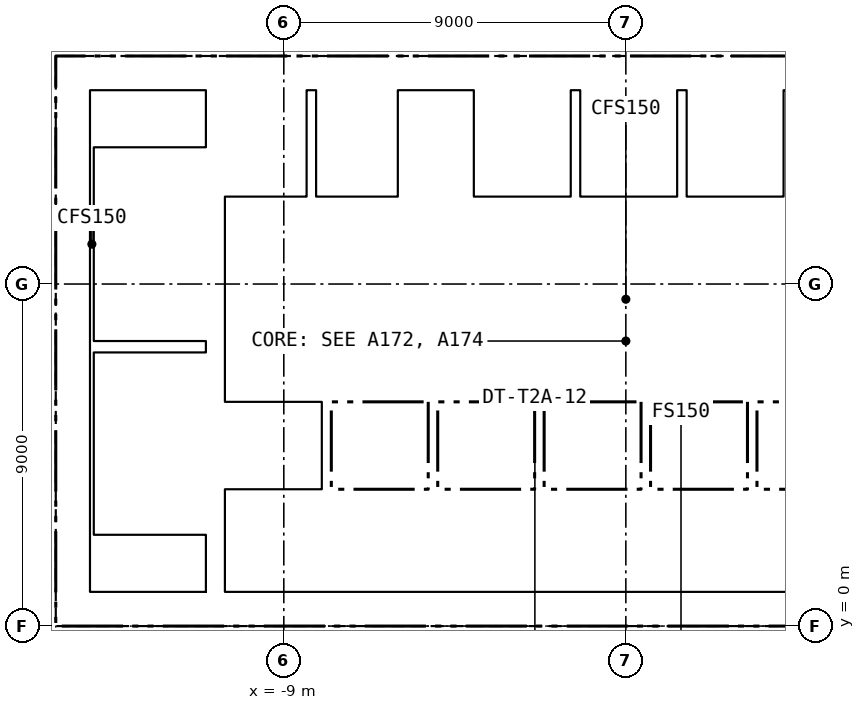
"""IFC4 building model, lengths in metres.
Left out: names, types, materials, properties, quantities, classifications, styles, units other than length and angle.
Written with IfcOpenShell. Run it as: python <this file> out.ifc"""

import sys

from ifc_helpers import new_model, si_unit, direction, frame, frame_2d, origin, place, context, subcontext, project, spatial, rectangle, extrude, element, fill, save


model = new_model("IFC4")
c1 = context("Model", 3, precision=1e-05, world=origin(), true_north=direction((0.0, 1.0)))
c2 = subcontext(c1, "Body", "Model", "MODEL_VIEW")
j1 = project(units=[si_unit("LENGTHUNIT", "METRE"), si_unit("PLANEANGLEUNIT", "RADIAN")], contexts=[c1])
p1 = place(None, origin())
s1 = spatial("IfcSite", under=j1, at=p1, CompositionType="ELEMENT")
p2 = place(p1, origin())
s2 = spatial("IfcBuilding", under=s1, at=p2, CompositionType="ELEMENT")
p3 = place(p2, frame((0.0, 0.0, 80.65)))
s3 = spatial("IfcBuildingStorey", under=s2, at=p3, CompositionType="ELEMENT", Elevation=80.65)
p4 = place(p3, frame((-15.0, 0.45, -0.15), z_axis=(0.0, 0.0, 1.0), x_axis=(1.0, 0.0, 0.0)))
e1 = element("IfcWall", 1, at=p4, inside=s3, PredefinedType="SOLIDWALL", context=c2, shape_type="SweptSolid", body=[
    extrude(rectangle(XDim=30.0, YDim=0.9, at=frame_2d((15.0, 0.0))), origin(), (0.0, 0.0, 1.0), 3.65),
])
p5 = place(p4, frame((5.8, 0.0, 0.15)))
e2 = element("IfcOpeningElement", 2, at=p5, cuts=e1, PredefinedType="OPENING", context=c2, shape_type="SweptSolid", body=[
    extrude(rectangle(XDim=2.4, YDim=2.4, at=frame_2d((1.2, 1.2))), frame((0.0, 0.46, 0.0), z_axis=(0.0, -1.0, 0.0), x_axis=(1.0, 0.0, 0.0)), (0.0, 0.0, 1.0), 0.92),
])
p6 = place(p4, frame((13.8, 0.0, 0.15)))
e3 = element("IfcOpeningElement", 3, at=p6, cuts=e1, PredefinedType="OPENING", context=c2, shape_type="SweptSolid", body=[
    extrude(rectangle(XDim=2.4, YDim=2.4, at=frame_2d((1.2, 1.2))), frame((0.0, 0.46, 0.0), z_axis=(0.0, -1.0, 0.0), x_axis=(1.0, 0.0, 0.0)), (0.0, 0.0, 1.0), 0.92),
])
p7 = place(p4, frame((21.8, 0.0, 0.15)))
e4 = element("IfcOpeningElement", 4, at=p7, cuts=e1, PredefinedType="OPENING", context=c2, shape_type="SweptSolid", body=[
    extrude(rectangle(XDim=2.4, YDim=2.4, at=frame_2d((1.2, 1.2))), frame((0.0, 0.46, 0.0), z_axis=(0.0, -1.0, 0.0), x_axis=(1.0, 0.0, 0.0)), (0.0, 0.0, 1.0), 0.92),
])
p8 = place(p4, frame((1.5, 0.0, 0.15)))
e5 = element("IfcOpeningElement", 5, at=p8, cuts=e1, PredefinedType="OPENING", context=c2, shape_type="SweptSolid", body=[
    extrude(rectangle(XDim=1.2, YDim=2.1, at=frame_2d((0.6, 1.05))), frame((0.0, 0.46, 0.0), z_axis=(0.0, -1.0, 0.0), x_axis=(1.0, 0.0, 0.0)), (0.0, 0.0, 1.0), 0.92),
])
p9 = place(p4, frame((27.3, 0.0, 0.15)))
e6 = element("IfcOpeningElement", 6, at=p9, cuts=e1, PredefinedType="OPENING", context=c2, shape_type="SweptSolid", body=[
    extrude(rectangle(XDim=1.2, YDim=2.1, at=frame_2d((0.6, 1.05))), frame((0.0, 0.46, 0.0), z_axis=(0.0, -1.0, 0.0), x_axis=(1.0, 0.0, 0.0)), (0.0, 0.0, 1.0), 0.92),
])
p10 = place(p3, frame((-15.0, 14.55, -0.15), z_axis=(0.0, 0.0, 1.0), x_axis=(1.0, 0.0, 0.0)))
e7 = element("IfcWall", 7, at=p10, inside=s3, PredefinedType="SOLIDWALL", context=c2, shape_type="SweptSolid", body=[
    extrude(rectangle(XDim=30.0, YDim=0.9, at=frame_2d((15.0, 0.0))), origin(), (0.0, 0.0, 1.0), 3.65),
])
p11 = place(p10, frame((9.25, 0.0, 0.15)))
e8 = element("IfcOpeningElement", 8, at=p11, cuts=e7, PredefinedType="OPENING", context=c2, shape_type="SweptSolid", body=[
    extrude(rectangle(XDim=1.5, YDim=2.1, at=frame_2d((0.75, 1.05))), frame((0.0, 0.46, 0.0), z_axis=(0.0, -1.0, 0.0), x_axis=(1.0, 0.0, 0.0)), (0.0, 0.0, 1.0), 0.92),
])
p12 = place(p10, frame((19.4, 0.0, 0.15)))
e9 = element("IfcOpeningElement", 9, at=p12, cuts=e7, PredefinedType="OPENING", context=c2, shape_type="SweptSolid", body=[
    extrude(rectangle(XDim=1.5, YDim=2.1, at=frame_2d((0.75, 1.05))), frame((0.0, 0.46, 0.0), z_axis=(0.0, -1.0, 0.0), x_axis=(1.0, 0.0, 0.0)), (0.0, 0.0, 1.0), 0.92),
])
p13 = place(p10, frame((1.5, 0.0, 0.15)))
e10 = element("IfcOpeningElement", 10, at=p13, cuts=e7, PredefinedType="OPENING", context=c2, shape_type="SweptSolid", body=[
    extrude(rectangle(XDim=1.2, YDim=2.1, at=frame_2d((0.6, 1.05))), frame((0.0, 0.46, 0.0), z_axis=(0.0, -1.0, 0.0), x_axis=(1.0, 0.0, 0.0)), (0.0, 0.0, 1.0), 0.92),
])
p14 = place(p10, frame((27.3, 0.0, 0.15)))
e11 = element("IfcOpeningElement", 11, at=p14, cuts=e7, PredefinedType="OPENING", context=c2, shape_type="SweptSolid", body=[
    extrude(rectangle(XDim=1.2, YDim=2.1, at=frame_2d((0.6, 1.05))), frame((0.0, 0.46, 0.0), z_axis=(0.0, -1.0, 0.0), x_axis=(1.0, 0.0, 0.0)), (0.0, 0.0, 1.0), 0.92),
])
p15 = place(p3, frame((-14.55, 0.9, -0.15), z_axis=(0.0, 0.0, 1.0), x_axis=(0.0, 1.0, 0.0)))
e12 = element("IfcWall", 12, at=p15, inside=s3, PredefinedType="SOLIDWALL", context=c2, shape_type="SweptSolid", body=[
    extrude(rectangle(XDim=13.2, YDim=0.9, at=frame_2d((6.6, 0.0))), origin(), (0.0, 0.0, 1.0), 3.65),
])
p16 = place(p3, frame((-10.8, 0.9, -0.15), z_axis=(0.0, 0.0, 1.0), x_axis=(0.0, 1.0, 0.0)))
e13 = element("IfcWall", 13, at=p16, inside=s3, PredefinedType="SOLIDWALL", context=c2, shape_type="SweptSolid", body=[
    extrude(rectangle(XDim=13.2, YDim=0.5, at=frame_2d((6.6, 0.0))), origin(), (0.0, 0.0, 1.0), 3.65),
])
p17 = place(p3, frame((-10.55, 3.5, 0.0), z_axis=(0.0, 0.0, 1.0), x_axis=(1.0, 0.0, 0.0)))
e14 = element("IfcWall", 14, at=p17, inside=s3, PredefinedType="PARTITIONING", context=c2, shape_type="SweptSolid", body=[
    extrude(rectangle(XDim=21.1, YDim=0.2, at=frame_2d((10.55, 0.0))), origin(), (0.0, 0.0, 1.0), 3.5),
])
p18 = place(p17, frame((0.675, 0.0, 0.0)))
e15 = element("IfcOpeningElement", 15, at=p18, cuts=e14, PredefinedType="OPENING", context=c2, shape_type="SweptSolid", body=[
    extrude(rectangle(XDim=1.2, YDim=2.1, at=frame_2d((0.6, 1.05))), frame((0.0, 0.11, 0.0), z_axis=(0.0, -1.0, 0.0), x_axis=(1.0, 0.0, 0.0)), (0.0, 0.0, 1.0), 0.22),
])
p19 = place(p17, frame((3.475, 0.0, 0.0)))
e16 = element("IfcOpeningElement", 16, at=p19, cuts=e14, PredefinedType="OPENING", context=c2, shape_type="SweptSolid", body=[
    extrude(rectangle(XDim=1.2, YDim=2.1, at=frame_2d((0.6, 1.05))), frame((0.0, 0.11, 0.0), z_axis=(0.0, -1.0, 0.0), x_axis=(1.0, 0.0, 0.0)), (0.0, 0.0, 1.0), 0.22),
])
p20 = place(p17, frame((6.275, 0.0, 0.0)))
e17 = element("IfcOpeningElement", 17, at=p20, cuts=e14, PredefinedType="OPENING", context=c2, shape_type="SweptSolid", body=[
    extrude(rectangle(XDim=1.2, YDim=2.1, at=frame_2d((0.6, 1.05))), frame((0.0, 0.11, 0.0), z_axis=(0.0, -1.0, 0.0), x_axis=(1.0, 0.0, 0.0)), (0.0, 0.0, 1.0), 0.22),
])
p21 = place(p17, frame((9.075, 0.0, 0.0)))
e18 = element("IfcOpeningElement", 18, at=p21, cuts=e14, PredefinedType="OPENING", context=c2, shape_type="SweptSolid", body=[
    extrude(rectangle(XDim=1.2, YDim=2.1, at=frame_2d((0.6, 1.05))), frame((0.0, 0.11, 0.0), z_axis=(0.0, -1.0, 0.0), x_axis=(1.0, 0.0, 0.0)), (0.0, 0.0, 1.0), 0.22),
])
p22 = place(p17, frame((11.875, 0.0, 0.0)))
e19 = element("IfcOpeningElement", 19, at=p22, cuts=e14, PredefinedType="OPENING", context=c2, shape_type="SweptSolid", body=[
    extrude(rectangle(XDim=1.2, YDim=2.1, at=frame_2d((0.6, 1.05))), frame((0.0, 0.11, 0.0), z_axis=(0.0, -1.0, 0.0), x_axis=(1.0, 0.0, 0.0)), (0.0, 0.0, 1.0), 0.22),
])
p23 = place(p17, frame((14.675, 0.0, 0.0)))
e20 = element("IfcOpeningElement", 20, at=p23, cuts=e14, PredefinedType="OPENING", context=c2, shape_type="SweptSolid", body=[
    extrude(rectangle(XDim=1.2, YDim=2.1, at=frame_2d((0.6, 1.05))), frame((0.0, 0.11, 0.0), z_axis=(0.0, -1.0, 0.0), x_axis=(1.0, 0.0, 0.0)), (0.0, 0.0, 1.0), 0.22),
])
p24 = place(p17, frame((17.475, 0.0, 0.0)))
e21 = element("IfcOpeningElement", 21, at=p24, cuts=e14, PredefinedType="OPENING", context=c2, shape_type="SweptSolid", body=[
    extrude(rectangle(XDim=1.2, YDim=2.1, at=frame_2d((0.6, 1.05))), frame((0.0, 0.11, 0.0), z_axis=(0.0, -1.0, 0.0), x_axis=(1.0, 0.0, 0.0)), (0.0, 0.0, 1.0), 0.22),
])
p25 = place(p17, frame((19.9, 0.0, 0.0)))
e22 = element("IfcOpeningElement", 22, at=p25, cuts=e14, PredefinedType="OPENING", context=c2, shape_type="SweptSolid", body=[
    extrude(rectangle(XDim=0.9, YDim=2.1, at=frame_2d((0.45, 1.05))), frame((0.0, 0.11, 0.0), z_axis=(0.0, -1.0, 0.0), x_axis=(1.0, 0.0, 0.0)), (0.0, 0.0, 1.0), 0.22),
])
p26 = place(p3, frame((-10.55, 6.025, 0.0), z_axis=(0.0, 0.0, 1.0), x_axis=(1.0, 0.0, 0.0)))
e23 = element("IfcWall", 23, at=p26, inside=s3, PredefinedType="PARTITIONING", context=c2, shape_type="SweptSolid", body=[
    extrude(rectangle(XDim=21.1, YDim=0.25, at=frame_2d((10.55, 0.0))), origin(), (0.0, 0.0, 1.0), 3.5),
])
p27 = place(p3, frame((-4.125, 8.55, 0.0), z_axis=(0.0, 0.0, 1.0), x_axis=(1.0, 0.0, 0.0)))
e24 = element("IfcWall", 24, at=p27, inside=s3, PredefinedType="PARTITIONING", context=c2, shape_type="SweptSolid", body=[
    extrude(rectangle(XDim=14.675, YDim=0.2, at=frame_2d((7.337, 0.0))), origin(), (0.0, 0.0, 1.0), 3.5),
])
p28 = place(p27, frame((1.413, 0.0, 0.0)))
e25 = element("IfcOpeningElement", 25, at=p28, cuts=e24, PredefinedType="OPENING", context=c2, shape_type="SweptSolid", body=[
    extrude(rectangle(XDim=1.0, YDim=2.1, at=frame_2d((0.5, 1.05))), frame((0.0, 0.11, 0.0), z_axis=(0.0, -1.0, 0.0), x_axis=(1.0, 0.0, 0.0)), (0.0, 0.0, 1.0), 0.22),
])
p29 = place(p27, frame((5.0, 0.0, 0.0)))
e26 = element("IfcOpeningElement", 26, at=p29, cuts=e24, PredefinedType="OPENING", context=c2, shape_type="SweptSolid", body=[
    extrude(rectangle(XDim=1.0, YDim=2.1, at=frame_2d((0.5, 1.05))), frame((0.0, 0.11, 0.0), z_axis=(0.0, -1.0, 0.0), x_axis=(1.0, 0.0, 0.0)), (0.0, 0.0, 1.0), 0.22),
])
p30 = place(p27, frame((9.613, 0.0, 0.0)))
e27 = element("IfcOpeningElement", 27, at=p30, cuts=e24, PredefinedType="OPENING", context=c2, shape_type="SweptSolid", body=[
    extrude(rectangle(XDim=1.0, YDim=2.1, at=frame_2d((0.5, 1.05))), frame((0.0, 0.11, 0.0), z_axis=(0.0, -1.0, 0.0), x_axis=(1.0, 0.0, 0.0)), (0.0, 0.0, 1.0), 0.22),
])
p31 = place(p27, frame((13.475, 0.0, 0.0)))
e28 = element("IfcOpeningElement", 28, at=p31, cuts=e24, PredefinedType="OPENING", context=c2, shape_type="SweptSolid", body=[
    extrude(rectangle(XDim=0.9, YDim=2.1, at=frame_2d((0.45, 1.05))), frame((0.0, 0.11, 0.0), z_axis=(0.0, -1.0, 0.0), x_axis=(1.0, 0.0, 0.0)), (0.0, 0.0, 1.0), 0.22),
])
p32 = place(p3, frame((-10.55, 11.2, 0.0), z_axis=(0.0, 0.0, 1.0), x_axis=(1.0, 0.0, 0.0)))
e29 = element("IfcWall", 29, at=p32, inside=s3, PredefinedType="PARTITIONING", context=c2, shape_type="SweptSolid", body=[
    extrude(rectangle(XDim=4.8, YDim=0.2, at=frame_2d((2.4, 0.0))), origin(), (0.0, 0.0, 1.0), 3.5),
])
p33 = place(p32, frame((0.525, 0.0, 0.0)))
e30 = element("IfcOpeningElement", 30, at=p33, cuts=e29, PredefinedType="OPENING", context=c2, shape_type="SweptSolid", body=[
    extrude(rectangle(XDim=1.1, YDim=2.1, at=frame_2d((0.55, 1.05))), frame((0.0, 0.11, 0.0), z_axis=(0.0, -1.0, 0.0), x_axis=(1.0, 0.0, 0.0)), (0.0, 0.0, 1.0), 0.22),
])
p34 = place(p32, frame((2.925, 0.0, 0.0)))
e31 = element("IfcOpeningElement", 31, at=p34, cuts=e29, PredefinedType="OPENING", context=c2, shape_type="SweptSolid", body=[
    extrude(rectangle(XDim=1.1, YDim=2.1, at=frame_2d((0.55, 1.05))), frame((0.0, 0.11, 0.0), z_axis=(0.0, -1.0, 0.0), x_axis=(1.0, 0.0, 0.0)), (0.0, 0.0, 1.0), 0.22),
])
p35 = place(p3, frame((-4.25, 11.2, 0.0), z_axis=(0.0, 0.0, 1.0), x_axis=(1.0, 0.0, 0.0)))
e32 = element("IfcWall", 32, at=p35, inside=s3, PredefinedType="PARTITIONING", context=c2, shape_type="SweptSolid", body=[
    extrude(rectangle(XDim=8.65, YDim=0.2, at=frame_2d((4.325, 0.0))), origin(), (0.0, 0.0, 1.0), 3.5),
])
p36 = place(p35, frame((0.825, 0.0, 0.0)))
e33 = element("IfcOpeningElement", 33, at=p36, cuts=e32, PredefinedType="OPENING", context=c2, shape_type="SweptSolid", body=[
    extrude(rectangle(XDim=1.4, YDim=2.1, at=frame_2d((0.7, 1.05))), frame((0.0, 0.11, 0.0), z_axis=(0.0, -1.0, 0.0), x_axis=(1.0, 0.0, 0.0)), (0.0, 0.0, 1.0), 0.22),
])
p37 = place(p35, frame((3.625, 0.0, 0.0)))
e34 = element("IfcOpeningElement", 34, at=p37, cuts=e32, PredefinedType="OPENING", context=c2, shape_type="SweptSolid", body=[
    extrude(rectangle(XDim=1.4, YDim=2.1, at=frame_2d((0.7, 1.05))), frame((0.0, 0.11, 0.0), z_axis=(0.0, -1.0, 0.0), x_axis=(1.0, 0.0, 0.0)), (0.0, 0.0, 1.0), 0.22),
])
p38 = place(p3, frame((-4.125, 6.15, 0.0), z_axis=(0.0, 0.0, 1.0), x_axis=(0.0, 1.0, 0.0)))
e35 = element("IfcWall", 35, at=p38, inside=s3, PredefinedType="PARTITIONING", context=c2, shape_type="SweptSolid", body=[
    extrude(rectangle(XDim=4.95, YDim=0.25, at=frame_2d((2.475, 0.0))), origin(), (0.0, 0.0, 1.0), 3.5),
])
p39 = place(p38, frame((3.125, 0.0, 0.0)))
e36 = element("IfcOpeningElement", 36, at=p39, cuts=e35, PredefinedType="OPENING", context=c2, shape_type="SweptSolid", body=[
    extrude(rectangle(XDim=1.2, YDim=2.1, at=frame_2d((0.6, 1.05))), frame((0.0, 0.135, 0.0), z_axis=(0.0, -1.0, 0.0), x_axis=(1.0, 0.0, 0.0)), (0.0, 0.0, 1.0), 0.27),
])
for number, where, z_axis, x_axis in (
    (37, (-7.875, 3.6, 0.0), (0.0, 0.0, 1.0), (0.0, 1.0, 0.0)),
    (38, (-5.075, 3.6, 0.0), (0.0, 0.0, 1.0), (0.0, 1.0, 0.0)),
    (39, (-2.275, 3.6, 0.0), (0.0, 0.0, 1.0), (0.0, 1.0, 0.0)),
    (40, (0.525, 3.6, 0.0), (0.0, 0.0, 1.0), (0.0, 1.0, 0.0)),
    (41, (3.325, 3.6, 0.0), (0.0, 0.0, 1.0), (0.0, 1.0, 0.0)),
):
    element("IfcWall", number, at=place(p3, frame(where, z_axis=z_axis, x_axis=x_axis)), inside=s3, PredefinedType="PARTITIONING", context=c2, shape_type="SweptSolid", body=[
        extrude(rectangle(XDim=2.3, YDim=0.25, at=frame_2d((1.15, 0.0))), origin(), (0.0, 0.0, 1.0), 3.5),
    ])
for number, where, z_axis, x_axis in (
    (42, (-0.35, 6.15, 0.0), (0.0, 0.0, 1.0), (0.0, 1.0, 0.0)),
    (43, (3.1, 6.15, 0.0), (0.0, 0.0, 1.0), (0.0, 1.0, 0.0)),
):
    element("IfcWall", number, at=place(p3, frame(where, z_axis=z_axis, x_axis=x_axis)), inside=s3, PredefinedType="PARTITIONING", context=c2, shape_type="SweptSolid", body=[
        extrude(rectangle(XDim=2.3, YDim=0.15, at=frame_2d((1.15, 0.0))), origin(), (0.0, 0.0, 1.0), 3.5),
    ])
for number, where, z_axis, x_axis in (
    (44, (-8.275, 11.3, 0.0), (0.0, 0.0, 1.0), (0.0, 1.0, 0.0)),
    (45, (-5.875, 11.3, 0.0), (0.0, 0.0, 1.0), (0.0, 1.0, 0.0)),
    (46, (-4.125, 11.3, 0.0), (0.0, 0.0, 1.0), (0.0, 1.0, 0.0)),
    (47, (-1.325, 11.3, 0.0), (0.0, 0.0, 1.0), (0.0, 1.0, 0.0)),
    (48, (1.475, 11.3, 0.0), (0.0, 0.0, 1.0), (0.0, 1.0, 0.0)),
    (49, (4.275, 11.3, 0.0), (0.0, 0.0, 1.0), (0.0, 1.0, 0.0)),
):
    element("IfcWall", number, at=place(p3, frame(where, z_axis=z_axis, x_axis=x_axis)), inside=s3, PredefinedType="PARTITIONING", context=c2, shape_type="SweptSolid", body=[
        extrude(rectangle(XDim=2.8, YDim=0.25, at=frame_2d((1.4, 0.0))), origin(), (0.0, 0.0, 1.0), 3.5),
    ])
p40 = place(p3, frame((-14.0, 7.35, 0.0), z_axis=(0.0, 0.0, 1.0), x_axis=(1.0, 0.0, 0.0)))
e50 = element("IfcWall", 50, at=p40, inside=s3, PredefinedType="SOLIDWALL", context=c2, shape_type="SweptSolid", body=[
    extrude(rectangle(XDim=2.95, YDim=0.3, at=frame_2d((1.475, 0.0))), origin(), (0.0, 0.0, 1.0), 3.5),
])
p41 = place(p3, frame((-14.05, 0.9, 0.0), z_axis=(0.0, 0.0, 1.0), x_axis=(0.0, 1.0, 0.0)))
e51 = element("IfcWall", 51, at=p41, inside=s3, PredefinedType="SOLIDWALL", context=c2, shape_type="SweptSolid", body=[
    extrude(rectangle(XDim=13.2, YDim=0.1, at=frame_2d((6.6, 0.0))), origin(), (0.0, 0.0, 1.0), 3.5),
])
p42 = place(p39, origin())
e52 = element("IfcDoor", 52, at=p42, inside=s3, OperationType="SINGLE_SWING_LEFT", PredefinedType="DOOR", context=c2, shape_type="SweptSolid", body=[
    extrude(rectangle(XDim=1.2, YDim=2.1, at=frame_2d((0.6, 1.05))), frame((0.0, 0.025, 0.0), z_axis=(0.0, -1.0, 0.0), x_axis=(1.0, 0.0, 0.0)), (0.0, 0.0, 1.0), 0.05),
])
fill(e36, e52)
p43 = place(p18, origin())
e53 = element("IfcDoor", 53, at=p43, inside=s3, OperationType="DOUBLE_DOOR_SLIDING", PredefinedType="DOOR", context=c2, shape_type="SweptSolid", body=[
    extrude(rectangle(XDim=1.2, YDim=2.1, at=frame_2d((0.6, 1.05))), frame((0.0, 0.025, 0.0), z_axis=(0.0, -1.0, 0.0), x_axis=(1.0, 0.0, 0.0)), (0.0, 0.0, 1.0), 0.05),
])
fill(e15, e53)
p44 = place(p19, origin())
e54 = element("IfcDoor", 54, at=p44, inside=s3, OperationType="DOUBLE_DOOR_SLIDING", PredefinedType="DOOR", context=c2, shape_type="SweptSolid", body=[
    extrude(rectangle(XDim=1.2, YDim=2.1, at=frame_2d((0.6, 1.05))), frame((0.0, 0.025, 0.0), z_axis=(0.0, -1.0, 0.0), x_axis=(1.0, 0.0, 0.0)), (0.0, 0.0, 1.0), 0.05),
])
fill(e16, e54)
p45 = place(p20, origin())
e55 = element("IfcDoor", 55, at=p45, inside=s3, OperationType="DOUBLE_DOOR_SLIDING", PredefinedType="DOOR", context=c2, shape_type="SweptSolid", body=[
    extrude(rectangle(XDim=1.2, YDim=2.1, at=frame_2d((0.6, 1.05))), frame((0.0, 0.025, 0.0), z_axis=(0.0, -1.0, 0.0), x_axis=(1.0, 0.0, 0.0)), (0.0, 0.0, 1.0), 0.05),
])
fill(e17, e55)
p46 = place(p21, origin())
e56 = element("IfcDoor", 56, at=p46, inside=s3, OperationType="DOUBLE_DOOR_SLIDING", PredefinedType="DOOR", context=c2, shape_type="SweptSolid", body=[
    extrude(rectangle(XDim=1.2, YDim=2.1, at=frame_2d((0.6, 1.05))), frame((0.0, 0.025, 0.0), z_axis=(0.0, -1.0, 0.0), x_axis=(1.0, 0.0, 0.0)), (0.0, 0.0, 1.0), 0.05),
])
fill(e18, e56)
p47 = place(p22, origin())
e57 = element("IfcDoor", 57, at=p47, inside=s3, OperationType="DOUBLE_DOOR_SLIDING", PredefinedType="DOOR", context=c2, shape_type="SweptSolid", body=[
    extrude(rectangle(XDim=1.2, YDim=2.1, at=frame_2d((0.6, 1.05))), frame((0.0, 0.025, 0.0), z_axis=(0.0, -1.0, 0.0), x_axis=(1.0, 0.0, 0.0)), (0.0, 0.0, 1.0), 0.05),
])
fill(e19, e57)
p48 = place(p23, origin())
e58 = element("IfcDoor", 58, at=p48, inside=s3, OperationType="DOUBLE_DOOR_SLIDING", PredefinedType="DOOR", context=c2, shape_type="SweptSolid", body=[
    extrude(rectangle(XDim=1.2, YDim=2.1, at=frame_2d((0.6, 1.05))), frame((0.0, 0.025, 0.0), z_axis=(0.0, -1.0, 0.0), x_axis=(1.0, 0.0, 0.0)), (0.0, 0.0, 1.0), 0.05),
])
fill(e20, e58)
p49 = place(p28, origin())
e59 = element("IfcDoor", 59, at=p49, inside=s3, OperationType="SINGLE_SWING_LEFT", PredefinedType="DOOR", context=c2, shape_type="SweptSolid", body=[
    extrude(rectangle(XDim=1.0, YDim=2.1, at=frame_2d((0.5, 1.05))), frame((0.0, 0.025, 0.0), z_axis=(0.0, -1.0, 0.0), x_axis=(1.0, 0.0, 0.0)), (0.0, 0.0, 1.0), 0.05),
])
fill(e25, e59)
p50 = place(p29, origin())
e60 = element("IfcDoor", 60, at=p50, inside=s3, OperationType="SINGLE_SWING_RIGHT", PredefinedType="DOOR", context=c2, shape_type="SweptSolid", body=[
    extrude(rectangle(XDim=1.0, YDim=2.1, at=frame_2d((0.5, 1.05))), frame((0.0, 0.025, 0.0), z_axis=(0.0, -1.0, 0.0), x_axis=(1.0, 0.0, 0.0)), (0.0, 0.0, 1.0), 0.05),
])
fill(e26, e60)
p51 = place(p33, origin())
e61 = element("IfcDoor", 61, at=p51, inside=s3, OperationType="DOUBLE_DOOR_SLIDING", PredefinedType="DOOR", context=c2, shape_type="SweptSolid", body=[
    extrude(rectangle(XDim=1.1, YDim=2.1, at=frame_2d((0.55, 1.05))), frame((0.0, 0.025, 0.0), z_axis=(0.0, -1.0, 0.0), x_axis=(1.0, 0.0, 0.0)), (0.0, 0.0, 1.0), 0.05),
])
fill(e30, e61)
p52 = place(p34, origin())
e62 = element("IfcDoor", 62, at=p52, inside=s3, OperationType="DOUBLE_DOOR_SLIDING", PredefinedType="DOOR", context=c2, shape_type="SweptSolid", body=[
    extrude(rectangle(XDim=1.1, YDim=2.1, at=frame_2d((0.55, 1.05))), frame((0.0, 0.025, 0.0), z_axis=(0.0, -1.0, 0.0), x_axis=(1.0, 0.0, 0.0)), (0.0, 0.0, 1.0), 0.05),
])
fill(e31, e62)
p53 = place(p36, origin())
e63 = element("IfcDoor", 63, at=p53, inside=s3, OperationType="DOUBLE_DOOR_SLIDING", PredefinedType="DOOR", context=c2, shape_type="SweptSolid", body=[
    extrude(rectangle(XDim=1.4, YDim=2.1, at=frame_2d((0.7, 1.05))), frame((0.0, 0.025, 0.0), z_axis=(0.0, -1.0, 0.0), x_axis=(1.0, 0.0, 0.0)), (0.0, 0.0, 1.0), 0.05),
])
fill(e33, e63)
p54 = place(p37, origin())
e64 = element("IfcDoor", 64, at=p54, inside=s3, OperationType="DOUBLE_DOOR_SLIDING", PredefinedType="DOOR", context=c2, shape_type="SweptSolid", body=[
    extrude(rectangle(XDim=1.4, YDim=2.1, at=frame_2d((0.7, 1.05))), frame((0.0, 0.025, 0.0), z_axis=(0.0, -1.0, 0.0), x_axis=(1.0, 0.0, 0.0)), (0.0, 0.0, 1.0), 0.05),
])
fill(e34, e64)
p55 = place(p5, origin())
e65 = element("IfcDoor", 65, at=p55, inside=s3, OperationType="DOUBLE_DOOR_DOUBLE_SWING", PredefinedType="DOOR", context=c2, shape_type="SweptSolid", body=[
    extrude(rectangle(XDim=2.4, YDim=2.4, at=frame_2d((1.2, 1.2))), frame((0.0, 0.025, 0.0), z_axis=(0.0, -1.0, 0.0), x_axis=(1.0, 0.0, 0.0)), (0.0, 0.0, 1.0), 0.05),
])
fill(e2, e65)
p56 = place(p6, origin())
e66 = element("IfcDoor", 66, at=p56, inside=s3, OperationType="DOUBLE_DOOR_DOUBLE_SWING", PredefinedType="DOOR", context=c2, shape_type="SweptSolid", body=[
    extrude(rectangle(XDim=2.4, YDim=2.4, at=frame_2d((1.2, 1.2))), frame((0.0, 0.025, 0.0), z_axis=(0.0, -1.0, 0.0), x_axis=(1.0, 0.0, 0.0)), (0.0, 0.0, 1.0), 0.05),
])
fill(e3, e66)
p57 = place(p11, origin())
e67 = element("IfcDoor", 67, at=p57, inside=s3, OperationType="DOUBLE_DOOR_SINGLE_SWING", PredefinedType="DOOR", context=c2, shape_type="SweptSolid", body=[
    extrude(rectangle(XDim=1.5, YDim=2.1, at=frame_2d((0.75, 1.05))), frame((0.0, 0.025, 0.0), z_axis=(0.0, -1.0, 0.0), x_axis=(1.0, 0.0, 0.0)), (0.0, 0.0, 1.0), 0.05),
])
fill(e8, e67)
p58 = place(p13, origin())
e68 = element("IfcDoor", 68, at=p58, inside=s3, OperationType="SINGLE_SWING_RIGHT", PredefinedType="DOOR", context=c2, shape_type="SweptSolid", body=[
    extrude(rectangle(XDim=1.2, YDim=2.1, at=frame_2d((0.6, 1.05))), frame((0.0, 0.025, 0.0), z_axis=(0.0, -1.0, 0.0), x_axis=(1.0, 0.0, 0.0)), (0.0, 0.0, 1.0), 0.05),
])
fill(e10, e68)
p59 = place(p8, origin())
e69 = element("IfcDoor", 69, at=p59, inside=s3, OperationType="SINGLE_SWING_LEFT", PredefinedType="DOOR", context=c2, shape_type="SweptSolid", body=[
    extrude(rectangle(XDim=1.2, YDim=2.1, at=frame_2d((0.6, 1.05))), frame((0.0, 0.025, 0.0), z_axis=(0.0, -1.0, 0.0), x_axis=(1.0, 0.0, 0.0)), (0.0, 0.0, 1.0), 0.05),
])
fill(e5, e69)
save(model, sys.argv[1])
